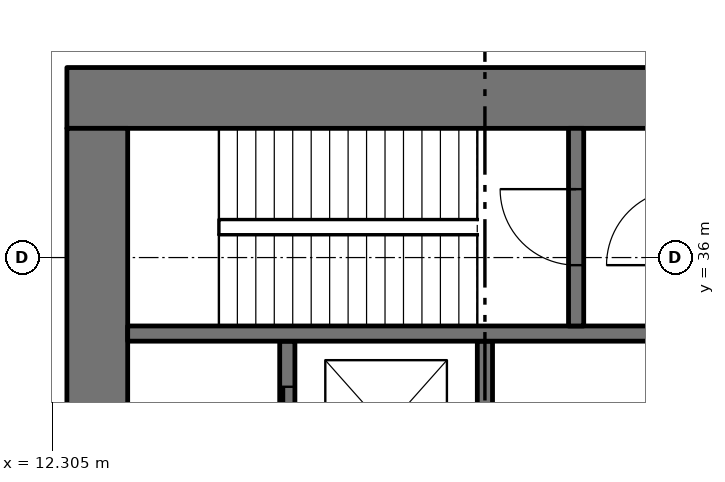
"""IFC4 building model, lengths in metres.
Left out: names, types, materials, properties, quantities, classifications, styles, units other than length and angle.
Written with IfcOpenShell. Run it as: python <this file> out.ifc"""

import sys

from ifc_helpers import new_model, si_unit, direction, frame, frame_2d, origin, place, context, subcontext, project, spatial, rectangle, extrude, element, fill, save


model = new_model("IFC4")
c1 = context("Model", 3, precision=1e-05, world=origin(), true_north=direction((0.0, 1.0)))
c2 = subcontext(c1, "Body", "Model", "MODEL_VIEW")
j1 = project(units=[si_unit("LENGTHUNIT", "METRE"), si_unit("PLANEANGLEUNIT", "RADIAN")], contexts=[c1])
p1 = place(None, origin())
s1 = spatial("IfcSite", under=j1, at=p1, CompositionType="ELEMENT")
p2 = place(p1, origin())
s2 = spatial("IfcBuilding", under=s1, at=p2, CompositionType="ELEMENT")
p3 = place(p2, frame((0.0, 0.0, 24.0)))
s3 = spatial("IfcBuildingStorey", under=s2, at=p3, CompositionType="ELEMENT", Elevation=24.0)
p4 = place(p3, frame((12.5, 38.1, 0.0), z_axis=(0.0, 0.0, 1.0), x_axis=(1.0, 0.0, 0.0)))
e1 = element("IfcWall", 1, at=p4, inside=s3, PredefinedType="SHEAR", context=c2, shape_type="SweptSolid", body=[
    extrude(rectangle(XDim=11.0, YDim=0.8, at=frame_2d((5.5, 0.0))), origin(), (0.0, 0.0, 1.0), 5.6),
])
p5 = place(p4, frame((8.4, 0.0, 0.0)))
e2 = element("IfcOpeningElement", 2, at=p5, cuts=e1, PredefinedType="OPENING", context=c2, shape_type="SweptSolid", body=[
    extrude(rectangle(XDim=1.6, YDim=2.1, at=frame_2d((0.8, 1.05))), frame((0.0, 0.41, 0.0), z_axis=(0.0, -1.0, 0.0), x_axis=(1.0, 0.0, 0.0)), (0.0, 0.0, 1.0), 0.82),
])
p6 = place(p3, frame((12.9, 22.3, 0.0), z_axis=(0.0, 0.0, 1.0), x_axis=(0.0, 1.0, 0.0)))
e3 = element("IfcWall", 3, at=p6, inside=s3, PredefinedType="SHEAR", context=c2, shape_type="SweptSolid", body=[
    extrude(rectangle(XDim=15.4, YDim=0.8, at=frame_2d((7.7, 0.0))), origin(), (0.0, 0.0, 1.0), 5.6),
])
p7 = place(p6, frame((8.15, 0.0, 0.0)))
e4 = element("IfcOpeningElement", 4, at=p7, cuts=e3, PredefinedType="OPENING", context=c2, shape_type="SweptSolid", body=[
    extrude(rectangle(XDim=1.6, YDim=2.1, at=frame_2d((0.8, 1.05))), frame((0.0, 0.41, 0.0), z_axis=(0.0, -1.0, 0.0), x_axis=(1.0, 0.0, 0.0)), (0.0, 0.0, 1.0), 0.82),
])
p8 = place(p6, frame((2.15, 0.0, 0.0)))
e5 = element("IfcOpeningElement", 5, at=p8, cuts=e3, PredefinedType="OPENING", context=c2, shape_type="SweptSolid", body=[
    extrude(rectangle(XDim=1.0, YDim=2.1, at=frame_2d((0.5, 1.05))), frame((0.0, 0.41, 0.0), z_axis=(0.0, -1.0, 0.0), x_axis=(1.0, 0.0, 0.0)), (0.0, 0.0, 1.0), 0.82),
])
p9 = place(p3, frame((15.4, 22.3, 0.0), z_axis=(0.0, 0.0, 1.0), x_axis=(0.0, 1.0, 0.0)))
e6 = element("IfcWall", 6, at=p9, inside=s3, PredefinedType="SOLIDWALL", context=c2, shape_type="SweptSolid", body=[
    extrude(rectangle(XDim=12.6, YDim=0.2, at=frame_2d((6.3, 0.0))), origin(), (0.0, 0.0, 1.0), 5.6),
])
p10 = place(p9, frame((3.4, 0.0, 0.0)))
e7 = element("IfcOpeningElement", 7, at=p10, cuts=e6, PredefinedType="OPENING", context=c2, shape_type="SweptSolid", body=[
    extrude(rectangle(XDim=1.1, YDim=2.1, at=frame_2d((0.55, 1.05))), frame((0.0, 0.11, 0.0), z_axis=(0.0, -1.0, 0.0), x_axis=(1.0, 0.0, 0.0)), (0.0, 0.0, 1.0), 0.22),
])
p11 = place(p9, frame((5.9, 0.0, 0.0)))
e8 = element("IfcOpeningElement", 8, at=p11, cuts=e6, PredefinedType="OPENING", context=c2, shape_type="SweptSolid", body=[
    extrude(rectangle(XDim=1.1, YDim=2.1, at=frame_2d((0.55, 1.05))), frame((0.0, 0.11, 0.0), z_axis=(0.0, -1.0, 0.0), x_axis=(1.0, 0.0, 0.0)), (0.0, 0.0, 1.0), 0.22),
])
p12 = place(p9, frame((8.4, 0.0, 0.0)))
e9 = element("IfcOpeningElement", 9, at=p12, cuts=e6, PredefinedType="OPENING", context=c2, shape_type="SweptSolid", body=[
    extrude(rectangle(XDim=1.1, YDim=2.1, at=frame_2d((0.55, 1.05))), frame((0.0, 0.11, 0.0), z_axis=(0.0, -1.0, 0.0), x_axis=(1.0, 0.0, 0.0)), (0.0, 0.0, 1.0), 0.22),
])
p13 = place(p9, frame((10.9, 0.0, 0.0)))
e10 = element("IfcOpeningElement", 10, at=p13, cuts=e6, PredefinedType="OPENING", context=c2, shape_type="SweptSolid", body=[
    extrude(rectangle(XDim=1.1, YDim=2.1, at=frame_2d((0.55, 1.05))), frame((0.0, 0.11, 0.0), z_axis=(0.0, -1.0, 0.0), x_axis=(1.0, 0.0, 0.0)), (0.0, 0.0, 1.0), 0.22),
])
p14 = place(p9, frame((0.15, 0.0, 0.0)))
e11 = element("IfcOpeningElement", 11, at=p14, cuts=e6, PredefinedType="OPENING", context=c2, shape_type="SweptSolid", body=[
    extrude(rectangle(XDim=1.0, YDim=2.1, at=frame_2d((0.5, 1.05))), frame((0.0, 0.11, 0.0), z_axis=(0.0, -1.0, 0.0), x_axis=(1.0, 0.0, 0.0)), (0.0, 0.0, 1.0), 0.22),
])
p15 = place(p3, frame((18.0, 25.1, 0.0), z_axis=(0.0, 0.0, 1.0), x_axis=(0.0, 1.0, 0.0)))
e12 = element("IfcWall", 12, at=p15, inside=s3, PredefinedType="SOLIDWALL", context=c2, shape_type="SweptSolid", body=[
    extrude(rectangle(XDim=9.8, YDim=0.2, at=frame_2d((4.9, 0.0))), origin(), (0.0, 0.0, 1.0), 5.6),
])
p16 = place(p3, frame((13.3, 35.0, 0.0), z_axis=(0.0, 0.0, 1.0), x_axis=(1.0, 0.0, 0.0)))
e13 = element("IfcWall", 13, at=p16, inside=s3, PredefinedType="SOLIDWALL", context=c2, shape_type="SweptSolid", body=[
    extrude(rectangle(XDim=7.2, YDim=0.2, at=frame_2d((3.6, 0.0))), origin(), (0.0, 0.0, 1.0), 5.6),
])
p17 = place(p3, frame((19.2, 35.1, 0.0), z_axis=(0.0, 0.0, 1.0), x_axis=(0.0, 1.0, 0.0)))
e14 = element("IfcWall", 14, at=p17, inside=s3, PredefinedType="SOLIDWALL", context=c2, shape_type="SweptSolid", body=[
    extrude(rectangle(XDim=2.6, YDim=0.2, at=frame_2d((1.3, 0.0))), origin(), (0.0, 0.0, 1.0), 5.6),
])
p18 = place(p17, frame((0.8, 0.0, 0.0)))
e15 = element("IfcOpeningElement", 15, at=p18, cuts=e14, PredefinedType="OPENING", context=c2, shape_type="SweptSolid", body=[
    extrude(rectangle(XDim=1.0, YDim=2.1, at=frame_2d((0.5, 1.05))), frame((0.0, 0.11, 0.0), z_axis=(0.0, -1.0, 0.0), x_axis=(1.0, 0.0, 0.0)), (0.0, 0.0, 1.0), 0.22),
])
p19 = place(p13, origin())
e16 = element("IfcDoor", 16, at=p19, inside=s3, OperationType="SLIDING_TO_LEFT", PredefinedType="DOOR", context=c2, shape_type="SweptSolid", body=[
    extrude(rectangle(XDim=1.1, YDim=2.1, at=frame_2d((0.55, 1.05))), frame((0.0, 0.025, 0.0), z_axis=(0.0, -1.0, 0.0), x_axis=(1.0, 0.0, 0.0)), (0.0, 0.0, 1.0), 0.05),
])
fill(e10, e16)
p20 = place(p18, origin())
e17 = element("IfcDoor", 17, at=p20, inside=s3, OperationType="SINGLE_SWING_LEFT", PredefinedType="DOOR", context=c2, shape_type="SweptSolid", body=[
    extrude(rectangle(XDim=1.0, YDim=2.1, at=frame_2d((0.5, 1.05))), frame((0.0, 0.025, 0.0), z_axis=(0.0, -1.0, 0.0), x_axis=(1.0, 0.0, 0.0)), (0.0, 0.0, 1.0), 0.05),
])
fill(e15, e17)
save(model, sys.argv[1])
